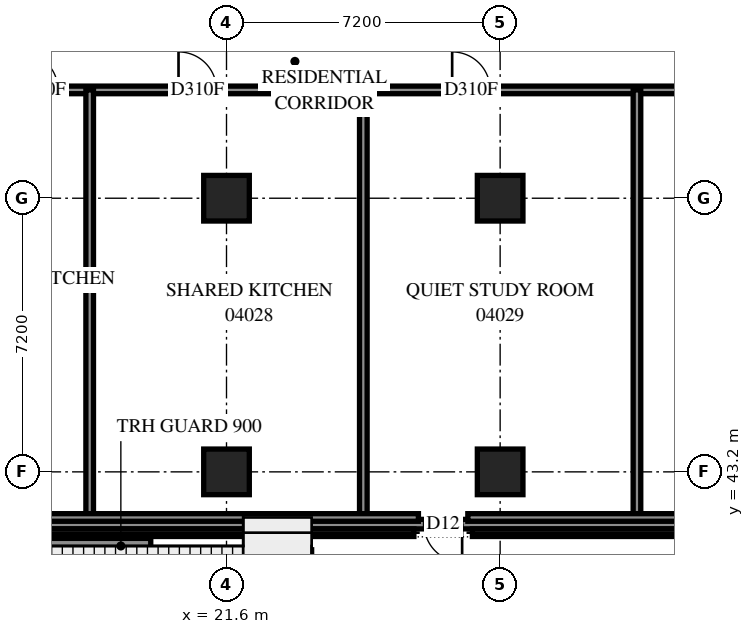
"""IFC4 building model, lengths in metres.
Left out: names, types, materials, properties, quantities, classifications, styles, units other than length and angle.
Written with IfcOpenShell. Run it as: python <this file> out.ifc"""

import sys

from ifc_helpers import new_model, si_unit, direction, frame, frame_2d, origin, origin_2d, place, context, subcontext, project, spatial, polyline, rectangle, outline, extrude, element, fill, save


model = new_model("IFC4")
c1 = context("Model", 3, precision=1e-05, world=origin(), true_north=direction((0.0, 1.0)))
c2 = subcontext(c1, "Body", "Model", "MODEL_VIEW")
j1 = project(units=[si_unit("LENGTHUNIT", "METRE"), si_unit("PLANEANGLEUNIT", "RADIAN")], contexts=[c1])
p1 = place(None, origin())
s1 = spatial("IfcSite", under=j1, at=p1, CompositionType="ELEMENT")
p2 = place(p1, origin())
s2 = spatial("IfcBuilding", under=s1, at=p2, CompositionType="ELEMENT")
p3 = place(p2, frame((0.0, 0.0, 18.6)))
s3 = spatial("IfcBuildingStorey", under=s2, at=p3, CompositionType="ELEMENT", Elevation=18.6)
for number, where, z_axis, x_axis in (
    (1, (21.6, 43.2, 0.0), (0.0, 0.0, 1.0), (1.0, 0.0, 0.0)),
    (2, (21.6, 50.4, 0.0), (0.0, 0.0, 1.0), (1.0, 0.0, 0.0)),
    (3, (28.8, 43.2, 0.0), (0.0, 0.0, 1.0), (1.0, 0.0, 0.0)),
    (4, (28.8, 50.4, 0.0), (0.0, 0.0, 1.0), (1.0, 0.0, 0.0)),
):
    element("IfcColumn", number, at=place(p3, frame(where, z_axis=z_axis, x_axis=x_axis)), inside=s3, PredefinedType="COLUMN", context=c2, shape_type="SweptSolid", body=[
        extrude(rectangle(XDim=1.2, YDim=1.2, at=origin_2d()), origin(), (0.0, 0.0, 1.0), 3.8),
    ])
p4 = place(p3, frame((23.69, 41.15, 0.0), z_axis=(0.0, 0.0, 1.0), x_axis=(0.0, -1.0, 0.0)))
e5 = element("IfcWall", 5, at=p4, inside=s3, PredefinedType="SOLIDWALL", context=c2, shape_type="SweptSolid", body=[
    extrude(rectangle(XDim=1.6, YDim=0.3, at=frame_2d((0.8, 0.0))), origin(), (0.0, 0.0, 1.0), 4.0),
])
p5 = place(p3, frame((20.108, 41.15, 0.0), z_axis=(0.0, 0.0, 1.0), x_axis=(0.0, -1.0, 0.0)))
e6 = element("IfcWall", 6, at=p5, inside=s3, PredefinedType="SOLIDWALL", context=c2, shape_type="SweptSolid", body=[
    extrude(rectangle(XDim=1.6, YDim=0.3, at=frame_2d((0.8, 0.0))), origin(), (0.0, 0.0, 1.0), 2.618),
])
p6 = place(p3, frame((17.854, 41.15, 0.0), z_axis=(0.0, 0.0, 1.0), x_axis=(0.0, -1.0, 0.0)))
e7 = element("IfcWall", 7, at=p6, inside=s3, PredefinedType="SOLIDWALL", context=c2, shape_type="SweptSolid", body=[
    extrude(rectangle(XDim=1.6, YDim=0.3, at=frame_2d((0.8, 0.0))), origin(), (0.0, 0.0, 1.0), 1.209),
])
p7 = place(p3, frame((0.0, 53.25, 0.0), z_axis=(0.0, 0.0, 1.0), x_axis=(1.0, 0.0, 0.0)))
e8 = element("IfcWall", 8, at=p7, inside=s3, PredefinedType="PARTITIONING", context=c2, shape_type="SweptSolid", body=[
    extrude(rectangle(XDim=55.1, YDim=0.2, at=frame_2d((27.55, 0.0))), origin(), (0.0, 0.0, 1.0), 3.8),
])
p8 = place(p7, frame((8.669, 0.0, 0.0)))
e9 = element("IfcOpeningElement", 9, at=p8, cuts=e8, PredefinedType="OPENING", context=c2, shape_type="SweptSolid", body=[
    extrude(rectangle(XDim=1.0, YDim=2.1, at=frame_2d((0.5, 1.05))), frame((0.0, 0.11, 0.0), z_axis=(0.0, -1.0, 0.0), x_axis=(1.0, 0.0, 0.0)), (0.0, 0.0, 1.0), 0.22),
])
p9 = place(p7, frame((11.635, 0.0, 0.0)))
e10 = element("IfcOpeningElement", 10, at=p9, cuts=e8, PredefinedType="OPENING", context=c2, shape_type="SweptSolid", body=[
    extrude(rectangle(XDim=1.0, YDim=2.1, at=frame_2d((0.5, 1.05))), frame((0.0, 0.11, 0.0), z_axis=(0.0, -1.0, 0.0), x_axis=(1.0, 0.0, 0.0)), (0.0, 0.0, 1.0), 0.22),
])
p10 = place(p7, frame((16.165, 0.0, 0.0)))
e11 = element("IfcOpeningElement", 11, at=p10, cuts=e8, PredefinedType="OPENING", context=c2, shape_type="SweptSolid", body=[
    extrude(rectangle(XDim=1.0, YDim=2.1, at=frame_2d((0.5, 1.05))), frame((0.0, 0.11, 0.0), z_axis=(0.0, -1.0, 0.0), x_axis=(1.0, 0.0, 0.0)), (0.0, 0.0, 1.0), 0.22),
])
p11 = place(p7, frame((20.337, 0.0, 0.0)))
e12 = element("IfcOpeningElement", 12, at=p11, cuts=e8, PredefinedType="OPENING", context=c2, shape_type="SweptSolid", body=[
    extrude(rectangle(XDim=1.0, YDim=2.1, at=frame_2d((0.5, 1.05))), frame((0.0, 0.11, 0.0), z_axis=(0.0, -1.0, 0.0), x_axis=(1.0, 0.0, 0.0)), (0.0, 0.0, 1.0), 0.22),
])
p12 = place(p7, frame((27.538, 0.0, 0.0)))
e13 = element("IfcOpeningElement", 13, at=p12, cuts=e8, PredefinedType="OPENING", context=c2, shape_type="SweptSolid", body=[
    extrude(rectangle(XDim=1.0, YDim=2.1, at=frame_2d((0.5, 1.05))), frame((0.0, 0.11, 0.0), z_axis=(0.0, -1.0, 0.0), x_axis=(1.0, 0.0, 0.0)), (0.0, 0.0, 1.0), 0.22),
])
p13 = place(p7, frame((34.737, 0.0, 0.0)))
e14 = element("IfcOpeningElement", 14, at=p13, cuts=e8, PredefinedType="OPENING", context=c2, shape_type="SweptSolid", body=[
    extrude(rectangle(XDim=1.0, YDim=2.1, at=frame_2d((0.5, 1.05))), frame((0.0, 0.11, 0.0), z_axis=(0.0, -1.0, 0.0), x_axis=(1.0, 0.0, 0.0)), (0.0, 0.0, 1.0), 0.22),
])
p14 = place(p7, frame((40.125, 0.0, 0.0)))
e15 = element("IfcOpeningElement", 15, at=p14, cuts=e8, PredefinedType="OPENING", context=c2, shape_type="SweptSolid", body=[
    extrude(rectangle(XDim=1.0, YDim=2.1, at=frame_2d((0.5, 1.05))), frame((0.0, 0.11, 0.0), z_axis=(0.0, -1.0, 0.0), x_axis=(1.0, 0.0, 0.0)), (0.0, 0.0, 1.0), 0.22),
])
p15 = place(p7, frame((46.758, 0.0, 0.0)))
e16 = element("IfcOpeningElement", 16, at=p15, cuts=e8, PredefinedType="OPENING", context=c2, shape_type="SweptSolid", body=[
    extrude(rectangle(XDim=1.0, YDim=2.1, at=frame_2d((0.5, 1.05))), frame((0.0, 0.11, 0.0), z_axis=(0.0, -1.0, 0.0), x_axis=(1.0, 0.0, 0.0)), (0.0, 0.0, 1.0), 0.22),
])
p16 = place(p7, frame((53.913, 0.0, 0.0)))
e17 = element("IfcOpeningElement", 17, at=p16, cuts=e8, PredefinedType="OPENING", context=c2, shape_type="SweptSolid", body=[
    extrude(rectangle(XDim=1.0, YDim=2.1, at=frame_2d((0.5, 1.05))), frame((0.0, 0.11, 0.0), z_axis=(0.0, -1.0, 0.0), x_axis=(1.0, 0.0, 0.0)), (0.0, 0.0, 1.0), 0.22),
])
p17 = place(p7, frame((2.672, 0.0, 0.0)))
e18 = element("IfcOpeningElement", 18, at=p17, cuts=e8, PredefinedType="OPENING", context=c2, shape_type="SweptSolid", body=[
    extrude(rectangle(XDim=1.0, YDim=2.1, at=frame_2d((0.5, 1.05))), frame((0.0, 0.11, 0.0), z_axis=(0.0, -1.0, 0.0), x_axis=(1.0, 0.0, 0.0)), (0.0, 0.0, 1.0), 0.22),
])
p18 = place(p7, frame((4.788, 0.0, 0.0)))
e19 = element("IfcOpeningElement", 19, at=p18, cuts=e8, PredefinedType="OPENING", context=c2, shape_type="SweptSolid", body=[
    extrude(rectangle(XDim=1.0, YDim=2.1, at=frame_2d((0.5, 1.05))), frame((0.0, 0.11, 0.0), z_axis=(0.0, -1.0, 0.0), x_axis=(1.0, 0.0, 0.0)), (0.0, 0.0, 1.0), 0.22),
])
for number, where, z_axis, x_axis in (
    (20, (18.0, 42.0, 0.0), (0.0, 0.0, 1.0), (0.0, 1.0, 0.0)),
    (21, (25.2, 42.0, 0.0), (0.0, 0.0, 1.0), (0.0, 1.0, 0.0)),
    (22, (32.4, 42.0, 0.0), (0.0, 0.0, 1.0), (0.0, 1.0, 0.0)),
):
    element("IfcWall", number, at=place(p3, frame(where, z_axis=z_axis, x_axis=x_axis)), inside=s3, PredefinedType="PARTITIONING", context=c2, shape_type="SweptSolid", body=[
        extrude(rectangle(XDim=11.25, YDim=0.2, at=frame_2d((5.625, 0.0))), origin(), (0.0, 0.0, 1.0), 3.8),
    ])
p19 = place(p3, frame((71.925, 41.825, 0.0), z_axis=(0.0, 0.0, 1.0), x_axis=(-1.0, 0.0, 0.0)))
e23 = element("IfcWall", 23, at=p19, inside=s3, PredefinedType="SOLIDWALL", context=c2, shape_type="SweptSolid", body=[
    extrude(rectangle(XDim=57.45, YDim=0.25, at=frame_2d((28.725, 0.0))), origin(), (0.0, 0.0, 1.0), 3.8),
])
p20 = place(p19, frame((12.325, 0.0, 0.0)))
e24 = element("IfcOpeningElement", 24, at=p20, cuts=e23, PredefinedType="OPENING", context=c2, shape_type="SweptSolid", body=[
    extrude(rectangle(XDim=1.0, YDim=2.1, at=frame_2d((0.5, 1.05))), frame((0.0, 0.135, 0.0), z_axis=(0.0, -1.0, 0.0), x_axis=(1.0, 0.0, 0.0)), (0.0, 0.0, 1.0), 0.27),
])
p21 = place(p19, frame((44.125, 0.0, 0.0)))
e25 = element("IfcOpeningElement", 25, at=p21, cuts=e23, PredefinedType="OPENING", context=c2, shape_type="SweptSolid", body=[
    extrude(rectangle(XDim=1.0, YDim=2.1, at=frame_2d((0.5, 1.05))), frame((0.0, 0.135, 0.0), z_axis=(0.0, -1.0, 0.0), x_axis=(1.0, 0.0, 0.0)), (0.0, 0.0, 1.0), 0.27),
])
p22 = place(p3, frame((13.75, 42.0, 0.0), z_axis=(0.0, 0.0, 1.0), x_axis=(1.0, 0.0, 0.0)))
e26 = element("IfcWall", 26, at=p22, inside=s3, PredefinedType="PARTITIONING", context=c2, shape_type="SweptSolid", body=[
    extrude(outline(polyline([(0.0, -0.1), (12.9, -0.1), (12.9, 0.1), (0.0, 0.1), (0.0, -0.1)])), origin(), (0.0, 0.0, 1.0), 3.8),
])
p23 = place(p3, frame((27.95, 42.0, 0.0), z_axis=(0.0, 0.0, 1.0), x_axis=(1.0, 0.0, 0.0)))
e27 = element("IfcWall", 27, at=p23, inside=s3, PredefinedType="PARTITIONING", context=c2, shape_type="SweptSolid", body=[
    extrude(outline(polyline([(0.0, -0.1), (30.5, -0.1), (30.5, 0.1), (0.0, 0.1), (0.0, -0.1)])), origin(), (0.0, 0.0, 1.0), 3.8),
])
p24 = place(p3, frame((58.33, 41.6, 0.0), z_axis=(0.0, 0.0, 1.0), x_axis=(-1.0, 0.0, 0.0)))
e28 = element("IfcWall", 28, at=p24, inside=s3, PredefinedType="PARAPET", context=c2, shape_type="SweptSolid", body=[
    extrude(outline(polyline([(0.0, -0.1), (30.26, -0.1), (30.26, 0.1), (0.0, 0.1), (0.0, -0.1)])), origin(), (0.0, 0.0, 1.0), 0.25),
])
p25 = place(p3, frame((26.53, 41.6, 0.0), z_axis=(0.0, 0.0, 1.0), x_axis=(-1.0, 0.0, 0.0)))
e29 = element("IfcWall", 29, at=p25, inside=s3, PredefinedType="PARAPET", context=c2, shape_type="SweptSolid", body=[
    extrude(outline(polyline([(0.0, -0.1), (12.78, -0.1), (12.78, 0.1), (0.0, 0.1), (0.0, -0.1)])), origin(), (0.0, 0.0, 1.0), 0.25),
])
p26 = place(p3, frame((19.607, 41.05, 0.0), z_axis=(0.0, 0.0, 1.0), x_axis=(-1.0, 0.0, 0.0)))
e30 = element("IfcWall", 30, at=p26, inside=s3, PredefinedType="SOLIDWALL", context=c2, shape_type="SweptSolid", body=[
    extrude(outline(polyline([(0.0, -0.4), (3.214, -0.4), (3.214, 0.4), (0.0, 0.4), (0.0, -0.4)])), origin(), (0.0, 0.0, 1.0), 0.65),
])
p27 = place(p10, origin())
e31 = element("IfcDoor", 31, at=p27, inside=s3, OperationType="SINGLE_SWING_LEFT", PredefinedType="DOOR", context=c2, shape_type="SweptSolid", body=[
    extrude(rectangle(XDim=1.0, YDim=2.1, at=frame_2d((0.5, 1.05))), frame((0.0, 0.025, 0.0), z_axis=(0.0, -1.0, 0.0), x_axis=(1.0, 0.0, 0.0)), (0.0, 0.0, 1.0), 0.05),
])
fill(e11, e31)
p28 = place(p11, origin())
e32 = element("IfcDoor", 32, at=p28, inside=s3, OperationType="SINGLE_SWING_RIGHT", PredefinedType="DOOR", context=c2, shape_type="SweptSolid", body=[
    extrude(rectangle(XDim=1.0, YDim=2.1, at=frame_2d((0.5, 1.05))), frame((0.0, 0.025, 0.0), z_axis=(0.0, -1.0, 0.0), x_axis=(1.0, 0.0, 0.0)), (0.0, 0.0, 1.0), 0.05),
])
fill(e12, e32)
p29 = place(p12, origin())
e33 = element("IfcDoor", 33, at=p29, inside=s3, OperationType="SINGLE_SWING_RIGHT", PredefinedType="DOOR", context=c2, shape_type="SweptSolid", body=[
    extrude(rectangle(XDim=1.0, YDim=2.1, at=frame_2d((0.5, 1.05))), frame((0.0, 0.025, 0.0), z_axis=(0.0, -1.0, 0.0), x_axis=(1.0, 0.0, 0.0)), (0.0, 0.0, 1.0), 0.05),
])
fill(e13, e33)
p30 = place(p21, origin())
e34 = element("IfcDoor", 34, at=p30, inside=s3, OperationType="SINGLE_SWING_LEFT", PredefinedType="DOOR", context=c2, shape_type="SweptSolid", body=[
    extrude(rectangle(XDim=1.0, YDim=2.1, at=frame_2d((0.5, 1.05))), frame((0.0, 0.025, 0.0), z_axis=(0.0, -1.0, 0.0), x_axis=(1.0, 0.0, 0.0)), (0.0, 0.0, 1.0), 0.05),
])
fill(e25, e34)
save(model, sys.argv[1])
